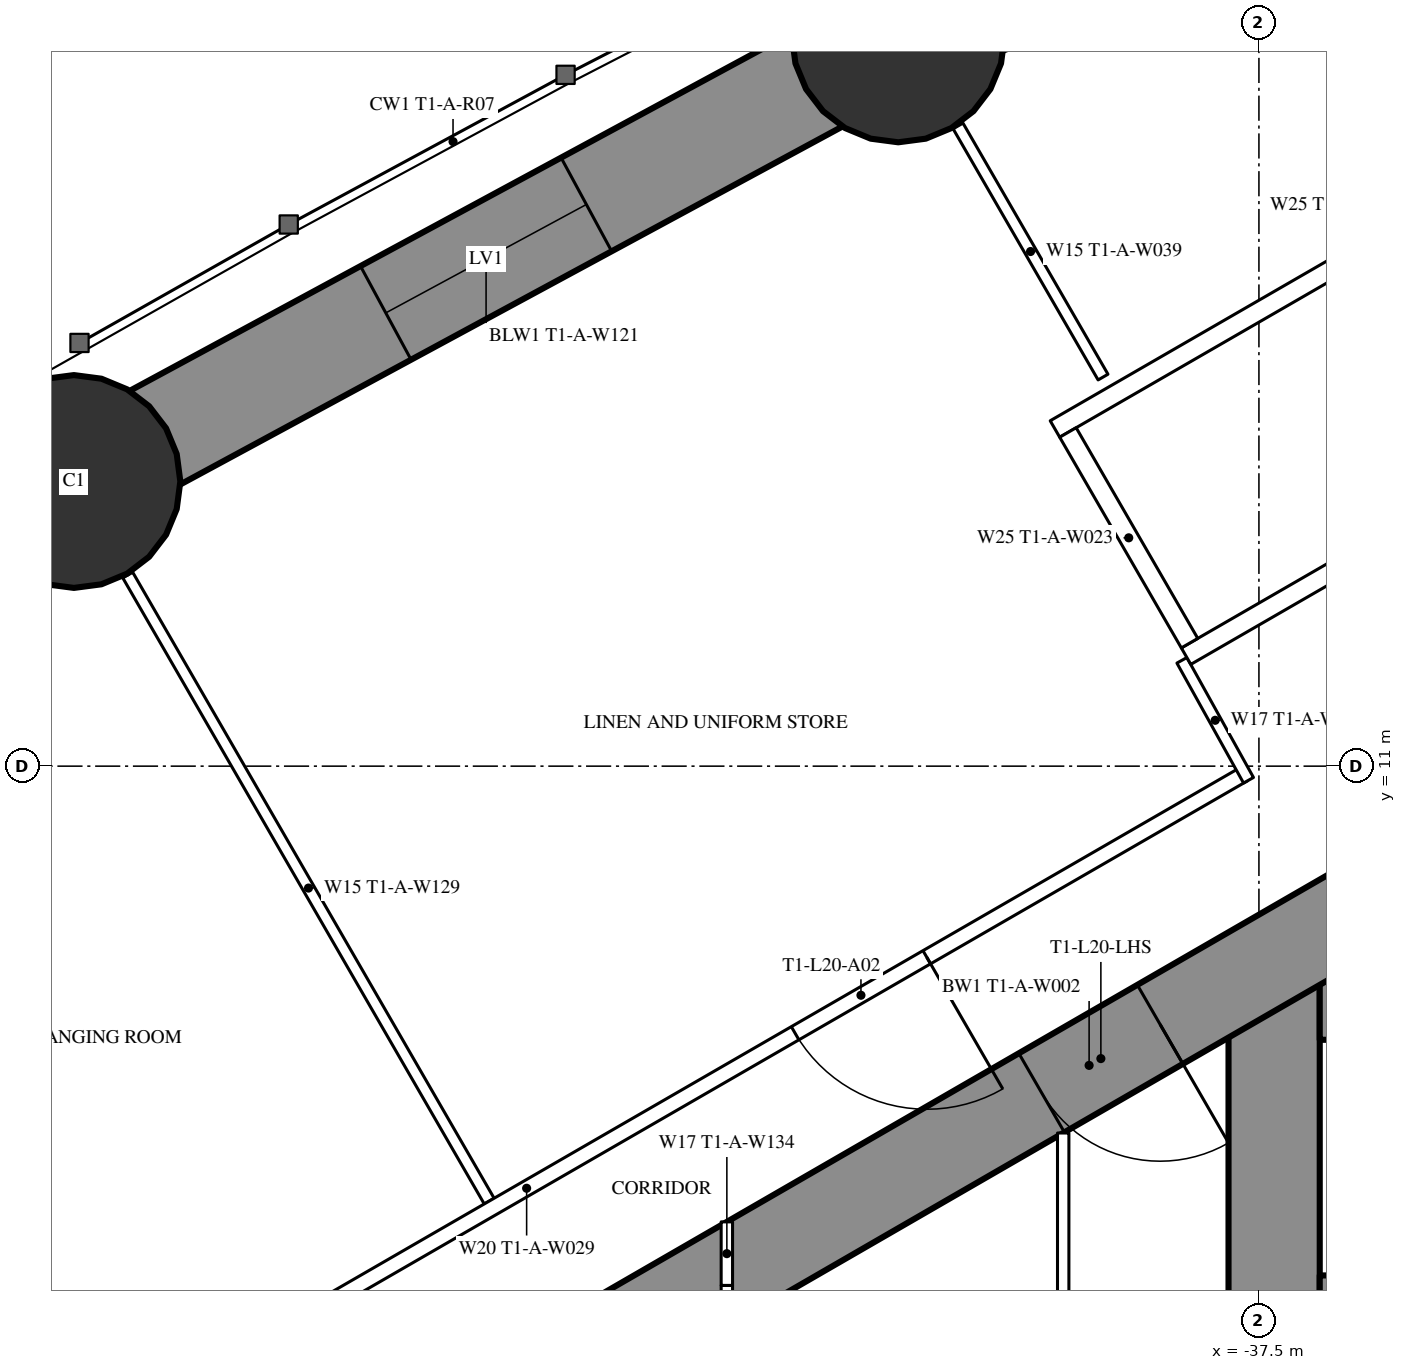
"""IFC4 building model, lengths in metres.
Left out: names, types, materials, properties, quantities, classifications, styles, units other than length and angle.
Written with IfcOpenShell. Run it as: python <this file> out.ifc"""

import sys

from ifc_helpers import new_model, si_unit, direction, frame, frame_2d, origin, origin_2d, place, context, subcontext, project, spatial, rectangle, hollow_circle, extrude, element, fill, save


model = new_model("IFC4")
c1 = context("Model", 3, precision=1e-05, world=origin(), true_north=direction((0.0, 1.0)))
c2 = subcontext(c1, "Body", "Model", "MODEL_VIEW")
j1 = project(units=[si_unit("LENGTHUNIT", "METRE"), si_unit("PLANEANGLEUNIT", "RADIAN")], contexts=[c1])
p1 = place(None, origin())
s1 = spatial("IfcSite", under=j1, at=p1, CompositionType="ELEMENT")
p2 = place(p1, origin())
s2 = spatial("IfcBuilding", under=s1, at=p2, CompositionType="ELEMENT")
p3 = place(p2, frame((0.0, 0.0, 77.5)))
s3 = spatial("IfcBuildingStorey", under=s2, at=p3, CompositionType="ELEMENT", Elevation=77.5)
for number, where, z_axis, x_axis in (
    (1, (-42.245, 20.607, 0.0), (0.0, 0.0, 1.0), (1.0, 0.0, 0.0)),
    (2, (-53.09, 14.745, 0.0), (0.0, 0.0, 1.0), (1.0, 0.0, 0.0)),
):
    element("IfcColumn", number, at=place(p3, frame(where, z_axis=z_axis, x_axis=x_axis)), inside=s3, PredefinedType="COLUMN", context=c2, shape_type="SweptSolid", body=[
        extrude(hollow_circle(Radius=1.4, WallThickness=0.12, at=origin_2d()), origin(), (0.0, 0.0, 1.0), 3.5),
    ])
p4 = place(p3, frame((-37.3, 8.6, 0.0), z_axis=(0.0, 0.0, 1.0), x_axis=(0.0, -1.0, 0.0)))
e3 = element("IfcWall", 3, at=p4, inside=s3, PredefinedType="SHEAR", context=c2, shape_type="SweptSolid", body=[
    extrude(rectangle(XDim=17.2, YDim=1.2, at=frame_2d((8.6, 0.0))), origin(), (0.0, 0.0, 1.0), 3.5),
])
p5 = place(p4, frame((7.7, 0.0, 0.0)))
e4 = element("IfcOpeningElement", 4, at=p5, cuts=e3, PredefinedType="OPENING", context=c2, shape_type="SweptSolid", body=[
    extrude(rectangle(XDim=1.8, YDim=2.2, at=frame_2d((0.9, 1.1))), frame((0.0, 0.61, 0.0), z_axis=(0.0, -1.0, 0.0), x_axis=(1.0, 0.0, 0.0)), (0.0, 0.0, 1.0), 1.22),
])
p6 = place(p3, frame((-28.3, 8.0, 0.0), z_axis=(0.0, 0.0, 1.0), x_axis=(-1.0, 0.0, 0.0)))
e5 = element("IfcWall", 5, at=p6, inside=s3, PredefinedType="SHEAR", context=c2, shape_type="SweptSolid", body=[
    extrude(rectangle(XDim=8.4, YDim=1.2, at=frame_2d((4.2, 0.0))), origin(), (0.0, 0.0, 1.0), 3.5),
])
p7 = place(p6, frame((0.25, 0.0, 0.0)))
e6 = element("IfcOpeningElement", 6, at=p7, cuts=e5, PredefinedType="OPENING", context=c2, shape_type="SweptSolid", body=[
    extrude(rectangle(XDim=1.0, YDim=2.2, at=frame_2d((0.5, 1.1))), frame((0.0, 0.61, 0.0), z_axis=(0.0, -1.0, 0.0), x_axis=(1.0, 0.0, 0.0)), (0.0, 0.0, 1.0), 1.22),
])
p8 = place(p3, frame((-28.3, 4.15, 0.0), z_axis=(0.0, 0.0, 1.0), x_axis=(-1.0, 0.0, 0.0)))
e7 = element("IfcWall", 7, at=p8, inside=s3, PredefinedType="SHEAR", context=c2, shape_type="SweptSolid", body=[
    extrude(rectangle(XDim=8.4, YDim=0.3, at=frame_2d((4.2, 0.0))), origin(), (0.0, 0.0, 1.0), 3.5),
])
p9 = place(p3, frame((-27.2, 14.3, 0.0), z_axis=(0.0, 0.0, 1.0), x_axis=(-0.866026593062, -0.499997940104, 0.0)))
e8 = element("IfcWall", 8, at=p9, inside=s3, PredefinedType="SHEAR", context=c2, shape_type="SweptSolid", body=[
    extrude(rectangle(XDim=28.946, YDim=1.2, at=frame_2d((14.473, 0.0))), origin(), (0.0, 0.0, 1.0), 3.5),
])
p10 = place(p9, frame((5.85, 0.0, 0.0)))
e9 = element("IfcOpeningElement", 9, at=p10, cuts=e8, PredefinedType="OPENING", context=c2, shape_type="SweptSolid", body=[
    extrude(rectangle(XDim=1.0, YDim=2.2, at=frame_2d((0.5, 1.1))), frame((0.0, 0.61, 0.0), z_axis=(0.0, -1.0, 0.0), x_axis=(1.0, 0.0, 0.0)), (0.0, 0.0, 1.0), 1.22),
])
p11 = place(p9, frame((13.395, 0.0, 0.0)))
e10 = element("IfcOpeningElement", 10, at=p11, cuts=e8, PredefinedType="OPENING", context=c2, shape_type="SweptSolid", body=[
    extrude(rectangle(XDim=1.8, YDim=2.04, at=frame_2d((0.9, 1.02))), frame((0.0, 0.61, 0.0), z_axis=(0.0, -1.0, 0.0), x_axis=(1.0, 0.0, 0.0)), (0.0, 0.0, 1.0), 1.22),
])
p12 = place(p3, frame((-29.703, 25.703, 0.0), z_axis=(0.0, 0.0, 1.0), x_axis=(-0.926463236197, -0.376385270667, 0.0)))
e11 = element("IfcWall", 11, at=p12, inside=s3, PredefinedType="SHEAR", context=c2, shape_type="SweptSolid", body=[
    extrude(rectangle(XDim=13.537, YDim=1.4, at=frame_2d((6.769, 0.0))), origin(), (0.0, 0.0, 1.0), 3.5),
])
p13 = place(p12, frame((5.269, 0.0, 0.6)))
e12 = element("IfcOpeningElement", 12, at=p13, cuts=e11, PredefinedType="OPENING", context=c2, shape_type="SweptSolid", body=[
    extrude(rectangle(XDim=3.0, YDim=1.2, at=frame_2d((1.5, 0.6))), frame((0.0, 0.71, 0.0), z_axis=(0.0, -1.0, 0.0), x_axis=(1.0, 0.0, 0.0)), (0.0, 0.0, 1.0), 1.42),
])
p14 = place(p3, frame((-42.245, 20.607, 0.0), z_axis=(0.0, 0.0, 1.0), x_axis=(-0.879692855603, -0.475542300749, 0.0)))
e13 = element("IfcWall", 13, at=p14, inside=s3, PredefinedType="SHEAR", context=c2, shape_type="SweptSolid", body=[
    extrude(rectangle(XDim=12.328, YDim=1.4, at=frame_2d((6.164, 0.0))), origin(), (0.0, 0.0, 1.0), 3.5),
])
p15 = place(p14, frame((4.664, 0.0, 0.6)))
e14 = element("IfcOpeningElement", 14, at=p15, cuts=e13, PredefinedType="OPENING", context=c2, shape_type="SweptSolid", body=[
    extrude(rectangle(XDim=3.0, YDim=1.2, at=frame_2d((1.5, 0.6))), frame((0.0, 0.71, 0.0), z_axis=(0.0, -1.0, 0.0), x_axis=(1.0, 0.0, 0.0)), (0.0, 0.0, 1.0), 1.42),
])
p16 = place(p3, frame((-53.09, 14.745, 0.0), z_axis=(0.0, 0.0, 1.0), x_axis=(-0.850225894333, -0.526418016984, 0.0)))
e15 = element("IfcWall", 15, at=p16, inside=s3, PredefinedType="SHEAR", context=c2, shape_type="SweptSolid", body=[
    extrude(rectangle(XDim=12.328, YDim=1.4, at=frame_2d((6.164, 0.0))), origin(), (0.0, 0.0, 1.0), 3.5),
])
p17 = place(p16, frame((4.664, 0.0, 0.6)))
e16 = element("IfcOpeningElement", 16, at=p17, cuts=e15, PredefinedType="OPENING", context=c2, shape_type="SweptSolid", body=[
    extrude(rectangle(XDim=3.0, YDim=1.2, at=frame_2d((1.5, 0.6))), frame((0.0, 0.71, 0.0), z_axis=(0.0, -1.0, 0.0), x_axis=(1.0, 0.0, 0.0)), (0.0, 0.0, 1.0), 1.42),
])
p18 = place(p3, frame((-47.627, 5.278, 0.0), z_axis=(0.0, 0.0, 1.0), x_axis=(-0.500009844318, 0.86601972009, 0.0)))
e17 = element("IfcWall", 17, at=p18, inside=s3, PredefinedType="PARTITIONING", context=c2, shape_type="SweptSolid", body=[
    extrude(rectangle(XDim=9.51, YDim=0.15, at=frame_2d((4.755, 0.0))), origin(), (0.0, 0.0, 1.0), 2.05),
])
p19 = place(p3, frame((-39.551, 16.119, 0.0), z_axis=(0.0, 0.0, 1.0), x_axis=(-0.500014214979, 0.866017196607, 0.0)))
e18 = element("IfcWall", 18, at=p19, inside=s3, PredefinedType="PARTITIONING", context=c2, shape_type="SweptSolid", body=[
    extrude(rectangle(XDim=3.815, YDim=0.15, at=frame_2d((1.907, 0.0))), origin(), (0.0, 0.0, 1.0), 3.25),
])
p20 = place(p3, frame((-37.7, 10.894, 0.0), z_axis=(0.0, 0.0, 1.0), x_axis=(-0.866027905338, -0.499995667157, 0.0)))
e19 = element("IfcWall", 19, at=p20, inside=s3, PredefinedType="PARTITIONING", context=c2, shape_type="SweptSolid", body=[
    extrude(rectangle(XDim=21.787, YDim=0.2, at=frame_2d((10.894, 0.0))), origin(), (0.0, 0.0, 1.0), 3.25),
])
p21 = place(p20, frame((14.644, 0.0, 0.0)))
e20 = element("IfcOpeningElement", 20, at=p21, cuts=e19, PredefinedType="OPENING", context=c2, shape_type="SweptSolid", body=[
    extrude(rectangle(XDim=1.8, YDim=2.2, at=frame_2d((0.9, 1.1))), frame((0.0, 0.11, 0.0), z_axis=(0.0, -1.0, 0.0), x_axis=(1.0, 0.0, 0.0)), (0.0, 0.0, 1.0), 0.22),
])
p22 = place(p20, frame((19.958, 0.0, 0.0)))
e21 = element("IfcOpeningElement", 21, at=p22, cuts=e19, PredefinedType="OPENING", context=c2, shape_type="SweptSolid", body=[
    extrude(rectangle(XDim=1.329, YDim=2.04, at=frame_2d((0.665, 1.02))), frame((0.0, 0.11, 0.0), z_axis=(0.0, -1.0, 0.0), x_axis=(1.0, 0.0, 0.0)), (0.0, 0.0, 1.0), 0.22),
])
p23 = place(p20, frame((4.815, 0.0, 0.0)))
e22 = element("IfcOpeningElement", 22, at=p23, cuts=e19, PredefinedType="OPENING", context=c2, shape_type="SweptSolid", body=[
    extrude(rectangle(XDim=2.0, YDim=2.4, at=frame_2d((1.0, 1.2))), frame((0.0, 0.11, 0.0), z_axis=(0.0, -1.0, 0.0), x_axis=(1.0, 0.0, 0.0)), (0.0, 0.0, 1.0), 0.22),
])
p24 = place(p3, frame((-38.513, 12.392, 0.0), z_axis=(0.0, 0.0, 1.0), x_axis=(0.485585508183, -0.874189175317, 0.0)))
e23 = element("IfcWall", 23, at=p24, inside=s3, PredefinedType="PARTITIONING", context=c2, shape_type="SweptSolid", body=[
    extrude(rectangle(XDim=1.805, YDim=0.15, at=frame_2d((0.902, 0.0))), origin(), (0.0, 0.0, 1.0), 3.25),
])
p25 = place(p3, frame((-40.075, 6.174, 0.0), z_axis=(0.0, 0.0, 1.0), x_axis=(0.0, -1.0, 0.0)))
e24 = element("IfcWall", 24, at=p25, inside=s3, PredefinedType="PARTITIONING", context=c2, shape_type="SweptSolid", body=[
    extrude(rectangle(XDim=7.374, YDim=0.15, at=frame_2d((3.687, 0.0))), origin(), (0.0, 0.0, 1.0), 3.25),
])
p26 = place(p25, frame((2.787, 0.0, 0.0)))
e25 = element("IfcOpeningElement", 25, at=p26, cuts=e24, PredefinedType="OPENING", context=c2, shape_type="SweptSolid", body=[
    extrude(rectangle(XDim=1.8, YDim=2.2, at=frame_2d((0.9, 1.1))), frame((0.0, 0.085, 0.0), z_axis=(0.0, -1.0, 0.0), x_axis=(1.0, 0.0, 0.0)), (0.0, 0.0, 1.0), 0.17),
])
p27 = place(p3, frame((-44.5, 4.169, 0.0), z_axis=(0.0, 0.0, 1.0), x_axis=(0.0, -1.0, 0.0)))
e26 = element("IfcWall", 26, at=p27, inside=s3, PredefinedType="PARTITIONING", context=c2, shape_type="SweptSolid", body=[
    extrude(rectangle(XDim=9.173, YDim=0.15, at=frame_2d((4.587, 0.0))), origin(), (0.0, 0.0, 1.0), 3.25),
])
p28 = place(p27, frame((1.167, 0.0, 0.0)))
e27 = element("IfcOpeningElement", 27, at=p28, cuts=e26, PredefinedType="OPENING", context=c2, shape_type="SweptSolid", body=[
    extrude(rectangle(XDim=1.0, YDim=2.2, at=frame_2d((0.5, 1.1))), frame((0.0, 0.085, 0.0), z_axis=(0.0, -1.0, 0.0), x_axis=(1.0, 0.0, 0.0)), (0.0, 0.0, 1.0), 0.17),
])
p29 = place(p27, frame((6.171, 0.0, 0.0)))
e28 = element("IfcOpeningElement", 28, at=p29, cuts=e26, PredefinedType="OPENING", context=c2, shape_type="SweptSolid", body=[
    extrude(rectangle(XDim=1.0, YDim=2.2, at=frame_2d((0.5, 1.1))), frame((0.0, 0.085, 0.0), z_axis=(0.0, -1.0, 0.0), x_axis=(1.0, 0.0, 0.0)), (0.0, 0.0, 1.0), 0.17),
])
for number, where, z_axis, x_axis in (
    (29, (-31.01, 16.747, 0.0), (0.0, 0.0, 1.0), (-0.866, -0.5, 0.0)),
    (30, (-32.736, 19.736, 0.0), (0.0, 0.0, 1.0), (-0.866, -0.5, 0.0)),
):
    element("IfcWall", number, at=place(p3, frame(where, z_axis=z_axis, x_axis=x_axis)), inside=s3, PredefinedType="PARTITIONING", context=c2, shape_type="SweptSolid", body=[
        extrude(rectangle(XDim=8.6, YDim=0.25, at=frame_2d((4.3, 0.0))), origin(), (0.0, 0.0, 1.0), 3.25),
    ])
p30 = place(p3, frame((-38.413, 12.618, 0.0), z_axis=(0.0, 0.0, 1.0), x_axis=(-0.499872130319, 0.866099216793, 0.0)))
e31 = element("IfcWall", 31, at=p30, inside=s3, PredefinedType="PARTITIONING", context=c2, shape_type="SweptSolid", body=[
    extrude(rectangle(XDim=3.2, YDim=0.25, at=frame_2d((1.6, 0.0))), origin(), (0.0, 0.0, 1.0), 3.25),
])
p31 = place(p3, frame((-44.5, 5.005, 0.0), z_axis=(0.0, 0.0, 1.0), x_axis=(0.0, -1.0, 0.0)))
e32 = element("IfcWall", 32, at=p31, inside=s3, PredefinedType="PARTITIONING", context=c2, shape_type="SweptSolid", body=[
    extrude(rectangle(XDim=0.836, YDim=0.15, at=frame_2d((0.418, 0.0))), origin(), (0.0, 0.0, 1.0), 2.05),
])
p32 = place(p15, origin())
e33 = element("IfcWindow", 33, at=p32, inside=s3, PartitioningType="SINGLE_PANEL", PredefinedType="WINDOW", context=c2, shape_type="SweptSolid", body=[
    extrude(rectangle(XDim=3.0, YDim=1.2, at=frame_2d((1.5, 0.6))), frame((0.0, 0.03, 0.0), z_axis=(0.0, -1.0, 0.0), x_axis=(1.0, 0.0, 0.0)), (0.0, 0.0, 1.0), 0.06),
])
fill(e14, e33)
p33 = place(p23, origin())
e34 = element("IfcDoor", 34, at=p33, inside=s3, OperationType="DOUBLE_DOOR_SINGLE_SWING", PredefinedType="DOOR", context=c2, shape_type="SweptSolid", body=[
    extrude(rectangle(XDim=2.0, YDim=2.4, at=frame_2d((1.0, 1.2))), frame((0.0, 0.025, 0.0), z_axis=(0.0, -1.0, 0.0), x_axis=(1.0, 0.0, 0.0)), (0.0, 0.0, 1.0), 0.05),
])
fill(e22, e34)
p34 = place(p11, origin())
e35 = element("IfcDoor", 35, at=p34, inside=s3, OperationType="DOUBLE_DOOR_SINGLE_SWING", PredefinedType="DOOR", context=c2, shape_type="SweptSolid", body=[
    extrude(rectangle(XDim=1.8, YDim=2.04, at=frame_2d((0.9, 1.02))), frame((0.0, 0.025, 0.0), z_axis=(0.0, -1.0, 0.0), x_axis=(1.0, 0.0, 0.0)), (0.0, 0.0, 1.0), 0.05),
])
fill(e10, e35)
save(model, sys.argv[1])
